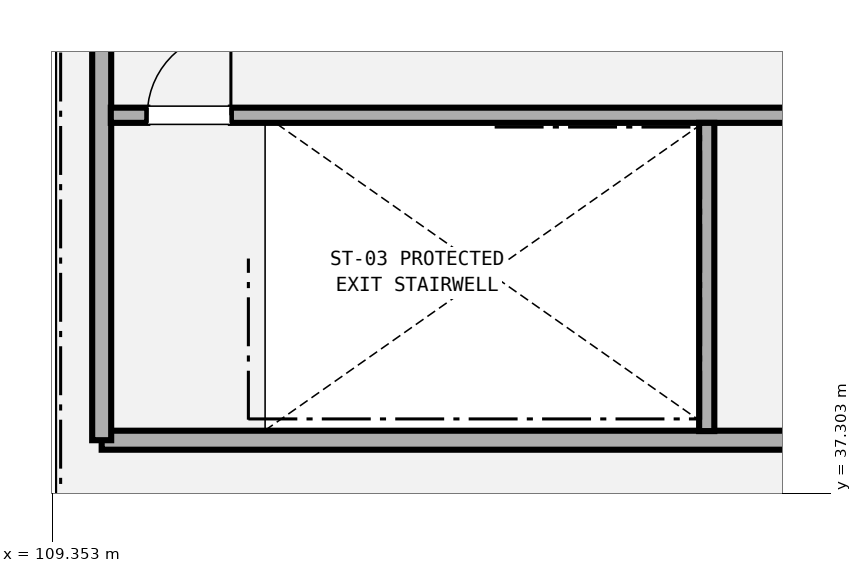
"""IFC4 building model, lengths in metres.
Left out: names, types, materials, properties, quantities, classifications, styles, units other than length and angle.
Written with IfcOpenShell. Run it as: python <this file> out.ifc"""

import sys

from ifc_helpers import new_model, si_unit, direction, frame, frame_2d, origin, place, context, subcontext, project, spatial, rectangle, extrude, element, fill, save


model = new_model("IFC4")
c1 = context("Model", 3, precision=1e-05, world=origin(), true_north=direction((0.0, 1.0)))
c2 = subcontext(c1, "Body", "Model", "MODEL_VIEW")
j1 = project(units=[si_unit("LENGTHUNIT", "METRE"), si_unit("PLANEANGLEUNIT", "RADIAN")], contexts=[c1])
p1 = place(None, origin())
s1 = spatial("IfcSite", under=j1, at=p1, CompositionType="ELEMENT")
p2 = place(p1, origin())
s2 = spatial("IfcBuilding", under=s1, at=p2, CompositionType="ELEMENT")
p3 = place(p2, frame((0.0, 0.0, 9.6)))
s3 = spatial("IfcBuildingStorey", under=s2, at=p3, CompositionType="ELEMENT", Elevation=9.6)
p4 = place(p3, frame((110.0, 38.0, 0.0), z_axis=(0.0, 0.0, 1.0), x_axis=(1.0, 0.0, 0.0)))
e1 = element("IfcWall", 1, at=p4, inside=s3, PredefinedType="SHEAR", context=c2, shape_type="SweptSolid", body=[
    extrude(rectangle(XDim=10.8, YDim=0.25, at=frame_2d((5.4, 0.0))), origin(), (0.0, 0.0, 1.0), 4.48),
])
p5 = place(p3, frame((110.0, 38.0, 0.0), z_axis=(0.0, 0.0, 1.0), x_axis=(0.0, 1.0, 0.0)))
e2 = element("IfcWall", 2, at=p5, inside=s3, PredefinedType="SHEAR", context=c2, shape_type="SweptSolid", body=[
    extrude(rectangle(XDim=8.6, YDim=0.25, at=frame_2d((4.3, 0.0))), origin(), (0.0, 0.0, 1.0), 4.48),
])
p6 = place(p3, frame((110.12, 42.275, 0.0), z_axis=(0.0, 0.0, 1.0), x_axis=(1.0, 0.0, 0.0)))
e3 = element("IfcWall", 3, at=p6, inside=s3, PredefinedType="SHEAR", context=c2, shape_type="SweptSolid", body=[
    extrude(rectangle(XDim=10.56, YDim=0.2, at=frame_2d((5.28, 0.0))), origin(), (0.0, 0.0, 1.0), 4.48),
])
p7 = place(p6, frame((0.48, 0.0, 0.0)))
e4 = element("IfcOpeningElement", 4, at=p7, cuts=e3, PredefinedType="OPENING", context=c2, shape_type="SweptSolid", body=[
    extrude(rectangle(XDim=1.1, YDim=2.2, at=frame_2d((0.55, 1.1))), frame((0.0, 0.11, 0.0), z_axis=(0.0, -1.0, 0.0), x_axis=(1.0, 0.0, 0.0)), (0.0, 0.0, 1.0), 0.22),
])
p8 = place(p3, frame((117.96, 38.12, 0.0), z_axis=(0.0, 0.0, 1.0), x_axis=(0.0, 1.0, 0.0)))
e5 = element("IfcWall", 5, at=p8, inside=s3, PredefinedType="SHEAR", context=c2, shape_type="SweptSolid", body=[
    extrude(rectangle(XDim=4.055, YDim=0.2, at=frame_2d((2.027, 0.0))), origin(), (0.0, 0.0, 1.0), 4.48),
])
p9 = place(p7, origin())
e6 = element("IfcDoor", 6, at=p9, inside=s3, OperationType="SINGLE_SWING_RIGHT", PredefinedType="DOOR", context=c2, shape_type="SweptSolid", body=[
    extrude(rectangle(XDim=1.1, YDim=2.2, at=frame_2d((0.55, 1.1))), frame((0.0, 0.025, 0.0), z_axis=(0.0, -1.0, 0.0), x_axis=(1.0, 0.0, 0.0)), (0.0, 0.0, 1.0), 0.05),
])
fill(e4, e6)
save(model, sys.argv[1])
